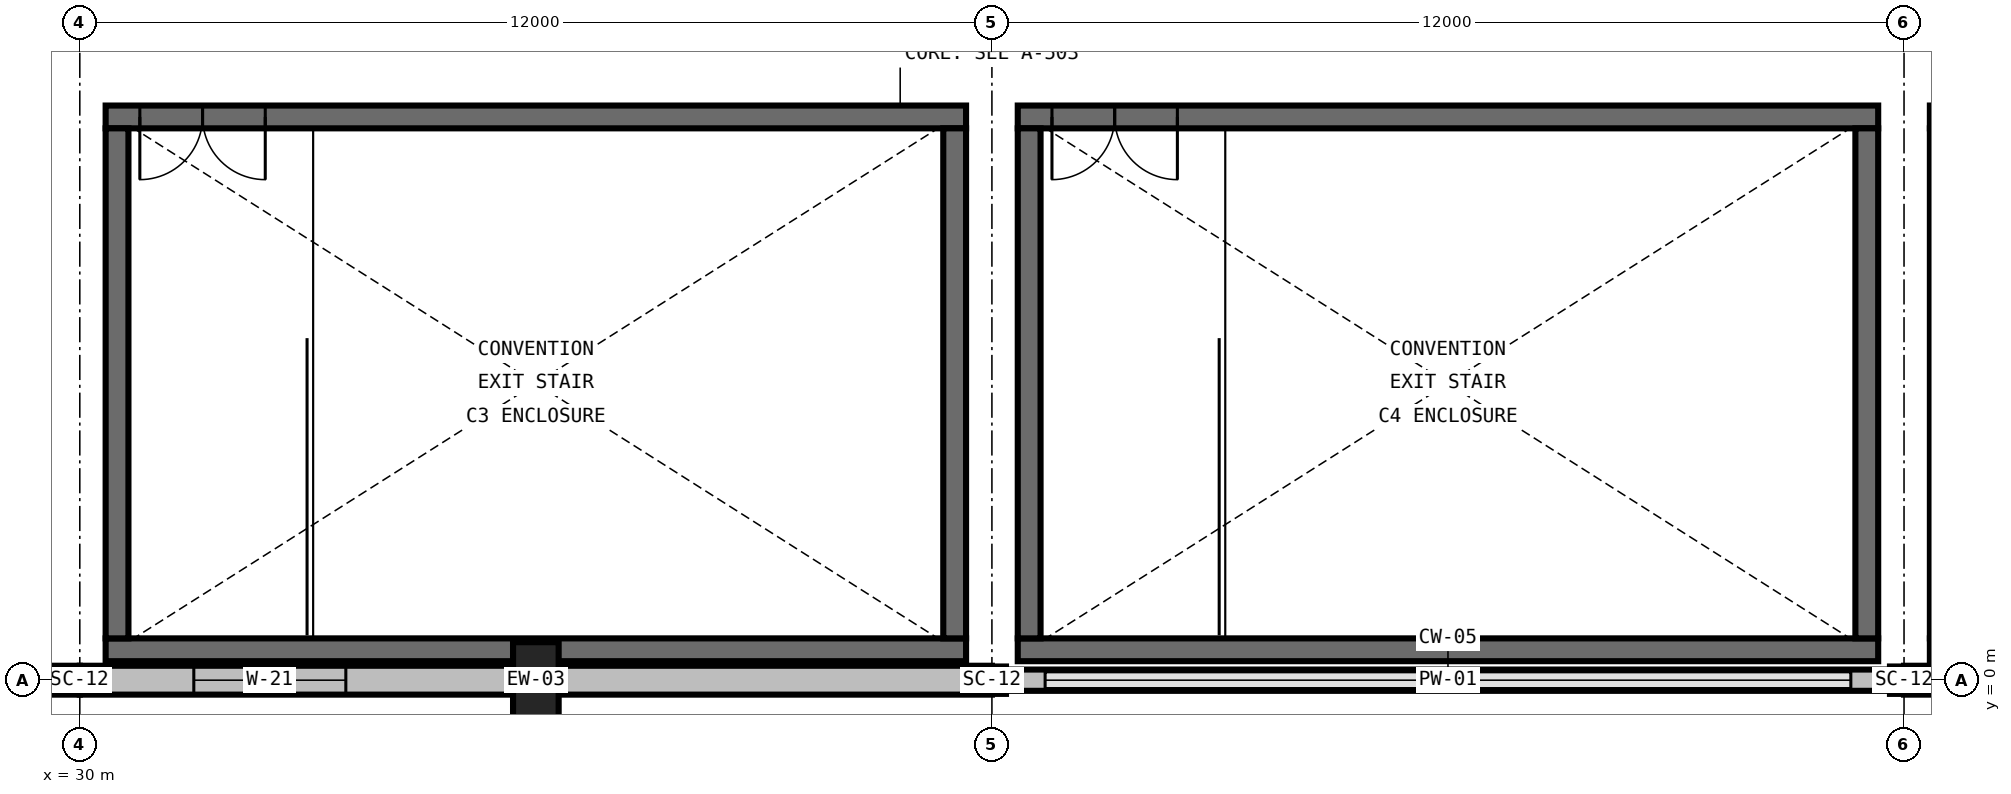
"""IFC4 building model, lengths in metres.
Left out: names, types, materials, properties, quantities, classifications, styles, units other than length and angle.
Written with IfcOpenShell. Run it as: python <this file> out.ifc"""

import sys

from ifc_helpers import new_model, si_unit, direction, frame, frame_2d, origin, origin_2d, place, context, subcontext, project, spatial, rectangle, i_section, extrude, element, fill, save


model = new_model("IFC4")
c1 = context("Model", 3, precision=1e-05, world=origin(), true_north=direction((0.0, 1.0)))
c2 = subcontext(c1, "Body", "Model", "MODEL_VIEW")
j1 = project(units=[si_unit("LENGTHUNIT", "METRE"), si_unit("PLANEANGLEUNIT", "RADIAN")], contexts=[c1])
p1 = place(None, origin())
s1 = spatial("IfcSite", under=j1, at=p1, CompositionType="ELEMENT")
p2 = place(p1, origin())
s2 = spatial("IfcBuilding", under=s1, at=p2, CompositionType="ELEMENT")
p3 = place(p2, frame((0.0, 0.0, 23.4)))
s3 = spatial("IfcBuildingStorey", under=s2, at=p3, CompositionType="ELEMENT", Elevation=23.4)
for number, where, z_axis, x_axis in (
    (1, (30.0, 0.0, 0.0), (0.0, 0.0, 1.0), (1.0, 0.0, 0.0)),
    (2, (42.0, 0.0, 0.0), (0.0, 0.0, 1.0), (1.0, 0.0, 0.0)),
    (3, (54.0, 0.0, 0.0), (0.0, 0.0, 1.0), (1.0, 0.0, 0.0)),
):
    element("IfcColumn", number, at=place(p3, frame(where, z_axis=z_axis, x_axis=x_axis)), inside=s3, PredefinedType="COLUMN", context=c2, shape_type="SweptSolid", body=[
        extrude(i_section(OverallWidth=0.37, OverallDepth=0.36, WebThickness=0.012, FlangeThickness=0.02, FilletRadius=0.031, at=origin_2d()), origin(), (0.0, 0.0, 1.0), 3.85),
    ])
p4 = place(p3, frame((36.0, 0.0, 0.0), z_axis=(0.0, 0.0, 1.0), x_axis=(1.0, 0.0, 0.0)))
e4 = element("IfcColumn", 4, at=p4, inside=s3, PredefinedType="PILASTER", context=c2, shape_type="SweptSolid", body=[
    extrude(rectangle(XDim=0.6, YDim=1.0, at=origin_2d()), origin(), (0.0, 0.0, 1.0), 3.85),
])
p5 = place(p3, frame((41.66, 0.4, 0.0), z_axis=(0.0, 0.0, 1.0), x_axis=(-1.0, 0.0, 0.0)))
e5 = element("IfcWall", 5, at=p5, inside=s3, PredefinedType="SHEAR", context=c2, shape_type="SweptSolid", body=[
    extrude(rectangle(XDim=11.32, YDim=0.3, at=frame_2d((5.66, 0.0))), origin(), (0.0, 0.0, 1.0), 3.85),
])
p6 = place(p3, frame((41.66, 7.41, 0.0), z_axis=(0.0, 0.0, 1.0), x_axis=(-1.0, 0.0, 0.0)))
e6 = element("IfcWall", 6, at=p6, inside=s3, PredefinedType="SHEAR", context=c2, shape_type="SweptSolid", body=[
    extrude(rectangle(XDim=11.32, YDim=0.3, at=frame_2d((5.66, 0.0))), origin(), (0.0, 0.0, 1.0), 3.85),
])
p7 = place(p6, frame((9.22, 0.0, 0.0)))
e7 = element("IfcOpeningElement", 7, at=p7, cuts=e6, PredefinedType="OPENING", context=c2, shape_type="SweptSolid", body=[
    extrude(rectangle(XDim=1.65, YDim=2.25, at=frame_2d((0.825, 1.125))), frame((0.0, 0.165, 0.0), z_axis=(0.0, -1.0, 0.0), x_axis=(1.0, 0.0, 0.0)), (0.0, 0.0, 1.0), 0.33),
])
for number, where, z_axis, x_axis in (
    (8, (30.49, 7.26, 0.0), (0.0, 0.0, 1.0), (0.0, -1.0, 0.0)),
    (9, (41.51, 0.55, 0.0), (0.0, 0.0, 1.0), (0.0, 1.0, 0.0)),
):
    element("IfcWall", number, at=place(p3, frame(where, z_axis=z_axis, x_axis=x_axis)), inside=s3, PredefinedType="SHEAR", context=c2, shape_type="SweptSolid", body=[
        extrude(rectangle(XDim=6.71, YDim=0.3, at=frame_2d((3.355, 0.0))), origin(), (0.0, 0.0, 1.0), 3.85),
    ])
p8 = place(p3, frame((53.66, 0.4, 0.0), z_axis=(0.0, 0.0, 1.0), x_axis=(-1.0, 0.0, 0.0)))
e10 = element("IfcWall", 10, at=p8, inside=s3, PredefinedType="SHEAR", context=c2, shape_type="SweptSolid", body=[
    extrude(rectangle(XDim=11.32, YDim=0.3, at=frame_2d((5.66, 0.0))), origin(), (0.0, 0.0, 1.0), 3.85),
])
p9 = place(p3, frame((53.66, 7.41, 0.0), z_axis=(0.0, 0.0, 1.0), x_axis=(-1.0, 0.0, 0.0)))
e11 = element("IfcWall", 11, at=p9, inside=s3, PredefinedType="SHEAR", context=c2, shape_type="SweptSolid", body=[
    extrude(rectangle(XDim=11.32, YDim=0.3, at=frame_2d((5.66, 0.0))), origin(), (0.0, 0.0, 1.0), 3.85),
])
p10 = place(p9, frame((9.22, 0.0, 0.0)))
e12 = element("IfcOpeningElement", 12, at=p10, cuts=e11, PredefinedType="OPENING", context=c2, shape_type="SweptSolid", body=[
    extrude(rectangle(XDim=1.65, YDim=2.25, at=frame_2d((0.825, 1.125))), frame((0.0, 0.165, 0.0), z_axis=(0.0, -1.0, 0.0), x_axis=(1.0, 0.0, 0.0)), (0.0, 0.0, 1.0), 0.33),
])
for number, where, z_axis, x_axis in (
    (13, (42.49, 7.26, 0.0), (0.0, 0.0, 1.0), (0.0, -1.0, 0.0)),
    (14, (53.51, 0.55, 0.0), (0.0, 0.0, 1.0), (0.0, 1.0, 0.0)),
):
    element("IfcWall", number, at=place(p3, frame(where, z_axis=z_axis, x_axis=x_axis)), inside=s3, PredefinedType="SHEAR", context=c2, shape_type="SweptSolid", body=[
        extrude(rectangle(XDim=6.71, YDim=0.3, at=frame_2d((3.355, 0.0))), origin(), (0.0, 0.0, 1.0), 3.85),
    ])
p11 = place(p3, frame((65.66, 0.4, 0.0), z_axis=(0.0, 0.0, 1.0), x_axis=(-1.0, 0.0, 0.0)))
e15 = element("IfcWall", 15, at=p11, inside=s3, PredefinedType="SHEAR", context=c2, shape_type="SweptSolid", body=[
    extrude(rectangle(XDim=11.32, YDim=0.3, at=frame_2d((5.66, 0.0))), origin(), (0.0, 0.0, 1.0), 3.85),
])
p12 = place(p3, frame((65.66, 7.41, 0.0), z_axis=(0.0, 0.0, 1.0), x_axis=(-1.0, 0.0, 0.0)))
e16 = element("IfcWall", 16, at=p12, inside=s3, PredefinedType="SHEAR", context=c2, shape_type="SweptSolid", body=[
    extrude(rectangle(XDim=11.32, YDim=0.3, at=frame_2d((5.66, 0.0))), origin(), (0.0, 0.0, 1.0), 3.85),
])
p13 = place(p12, frame((9.22, 0.0, 0.0)))
e17 = element("IfcOpeningElement", 17, at=p13, cuts=e16, PredefinedType="OPENING", context=c2, shape_type="SweptSolid", body=[
    extrude(rectangle(XDim=1.65, YDim=2.25, at=frame_2d((0.825, 1.125))), frame((0.0, 0.165, 0.0), z_axis=(0.0, -1.0, 0.0), x_axis=(1.0, 0.0, 0.0)), (0.0, 0.0, 1.0), 0.33),
])
p14 = place(p3, frame((54.49, 7.26, 0.0), z_axis=(0.0, 0.0, 1.0), x_axis=(0.0, -1.0, 0.0)))
e18 = element("IfcWall", 18, at=p14, inside=s3, PredefinedType="SHEAR", context=c2, shape_type="SweptSolid", body=[
    extrude(rectangle(XDim=6.71, YDim=0.3, at=frame_2d((3.355, 0.0))), origin(), (0.0, 0.0, 1.0), 3.85),
])
p15 = place(p3, frame((24.0, 0.0, 0.0), z_axis=(0.0, 0.0, 1.0), x_axis=(1.0, 0.0, 0.0)))
e19 = element("IfcWall", 19, at=p15, inside=s3, PredefinedType="STANDARD", context=c2, shape_type="SweptSolid", body=[
    extrude(rectangle(XDim=6.0, YDim=0.38, at=frame_2d((3.0, 0.0))), origin(), (0.0, 0.0, 1.0), 2.626),
])
p16 = place(p3, frame((30.0, 0.0, 0.0), z_axis=(0.0, 0.0, 1.0), x_axis=(1.0, 0.0, 0.0)))
e20 = element("IfcWall", 20, at=p16, inside=s3, PredefinedType="STANDARD", context=c2, shape_type="SweptSolid", body=[
    extrude(rectangle(XDim=12.0, YDim=0.38, at=frame_2d((6.0, 0.0))), origin(), (0.0, 0.0, 1.0), 2.626),
])
p17 = place(p16, frame((1.5, 0.0, 0.85)))
e21 = element("IfcOpeningElement", 21, at=p17, cuts=e20, PredefinedType="OPENING", context=c2, shape_type="SweptSolid", body=[
    extrude(rectangle(XDim=2.0, YDim=1.56, at=frame_2d((1.0, 0.78))), frame((0.0, 0.205, 0.0), z_axis=(0.0, -1.0, 0.0), x_axis=(1.0, 0.0, 0.0)), (0.0, 0.0, 1.0), 0.41),
])
p18 = place(p3, frame((42.0, 0.0, 0.0), z_axis=(0.0, 0.0, 1.0), x_axis=(1.0, 0.0, 0.0)))
e22 = element("IfcWall", 22, at=p18, inside=s3, PredefinedType="PARAPET", context=c2, shape_type="SweptSolid", body=[
    extrude(rectangle(XDim=12.0, YDim=0.28, at=frame_2d((6.0, 0.0))), origin(), (0.0, 0.0, 1.0), 0.2),
])
p19 = place(p3, frame((54.0, 0.0, 0.0), z_axis=(0.0, 0.0, 1.0), x_axis=(1.0, 0.0, 0.0)))
e23 = element("IfcWall", 23, at=p19, inside=s3, PredefinedType="STANDARD", context=c2, shape_type="SweptSolid", body=[
    extrude(rectangle(XDim=12.0, YDim=0.38, at=frame_2d((6.0, 0.0))), origin(), (0.0, 0.0, 1.0), 2.626),
])
p20 = place(p19, frame((1.5, 0.0, 0.85)))
e24 = element("IfcOpeningElement", 24, at=p20, cuts=e23, PredefinedType="OPENING", context=c2, shape_type="SweptSolid", body=[
    extrude(rectangle(XDim=2.0, YDim=1.56, at=frame_2d((1.0, 0.78))), frame((0.0, 0.205, 0.0), z_axis=(0.0, -1.0, 0.0), x_axis=(1.0, 0.0, 0.0)), (0.0, 0.0, 1.0), 0.41),
])
p21 = place(p3, frame((0.0, 0.14, 3.85), z_axis=(0.0, 0.0, 1.0), x_axis=(1.0, 0.0, 0.0)))
e25 = element("IfcWall", 25, at=p21, inside=s3, PredefinedType="PARAPET", context=c2, shape_type="SweptSolid", body=[
    extrude(rectangle(XDim=174.0, YDim=0.28, at=frame_2d((87.0, 0.0))), origin(), (0.0, 0.0, 1.0), 1.2),
])
p22 = place(p7, origin())
e26 = element("IfcDoor", 26, at=p22, inside=s3, OperationType="DOUBLE_DOOR_SINGLE_SWING", PredefinedType="DOOR", context=c2, shape_type="SweptSolid", body=[
    extrude(rectangle(XDim=1.65, YDim=2.25, at=frame_2d((0.825, 1.125))), frame((0.0, 0.025, 0.0), z_axis=(0.0, -1.0, 0.0), x_axis=(1.0, 0.0, 0.0)), (0.0, 0.0, 1.0), 0.05),
])
fill(e7, e26)
p23 = place(p3, frame((0.0, 0.0, 3.53)))
p24 = place(p23, frame((31.64, 3.905, 0.0)))
p25 = place(p24, frame((0.0, 0.0, 0.27)))
e27 = element("IfcDoor", 27, at=p25, inside=s3, OperationType="SWING_FIXED_LEFT", PredefinedType="TRAPDOOR", context=c2, shape_type="SweptSolid", body=[
    extrude(rectangle(XDim=1.0, YDim=1.2, at=origin_2d()), origin(), (0.0, 0.0, 1.0), 0.05),
])
p26 = place(p10, origin())
e28 = element("IfcDoor", 28, at=p26, inside=s3, OperationType="DOUBLE_DOOR_SINGLE_SWING", PredefinedType="DOOR", context=c2, shape_type="SweptSolid", body=[
    extrude(rectangle(XDim=1.65, YDim=2.25, at=frame_2d((0.825, 1.125))), frame((0.0, 0.025, 0.0), z_axis=(0.0, -1.0, 0.0), x_axis=(1.0, 0.0, 0.0)), (0.0, 0.0, 1.0), 0.05),
])
fill(e12, e28)
p27 = place(p17, origin())
e29 = element("IfcWindow", 29, at=p27, inside=s3, PartitioningType="DOUBLE_PANEL_VERTICAL", PredefinedType="WINDOW", context=c2, shape_type="SweptSolid", body=[
    extrude(rectangle(XDim=2.0, YDim=1.56, at=frame_2d((1.0, 0.78))), frame((0.0, 0.03, 0.0), z_axis=(0.0, -1.0, 0.0), x_axis=(1.0, 0.0, 0.0)), (0.0, 0.0, 1.0), 0.06),
])
fill(e21, e29)
save(model, sys.argv[1])
